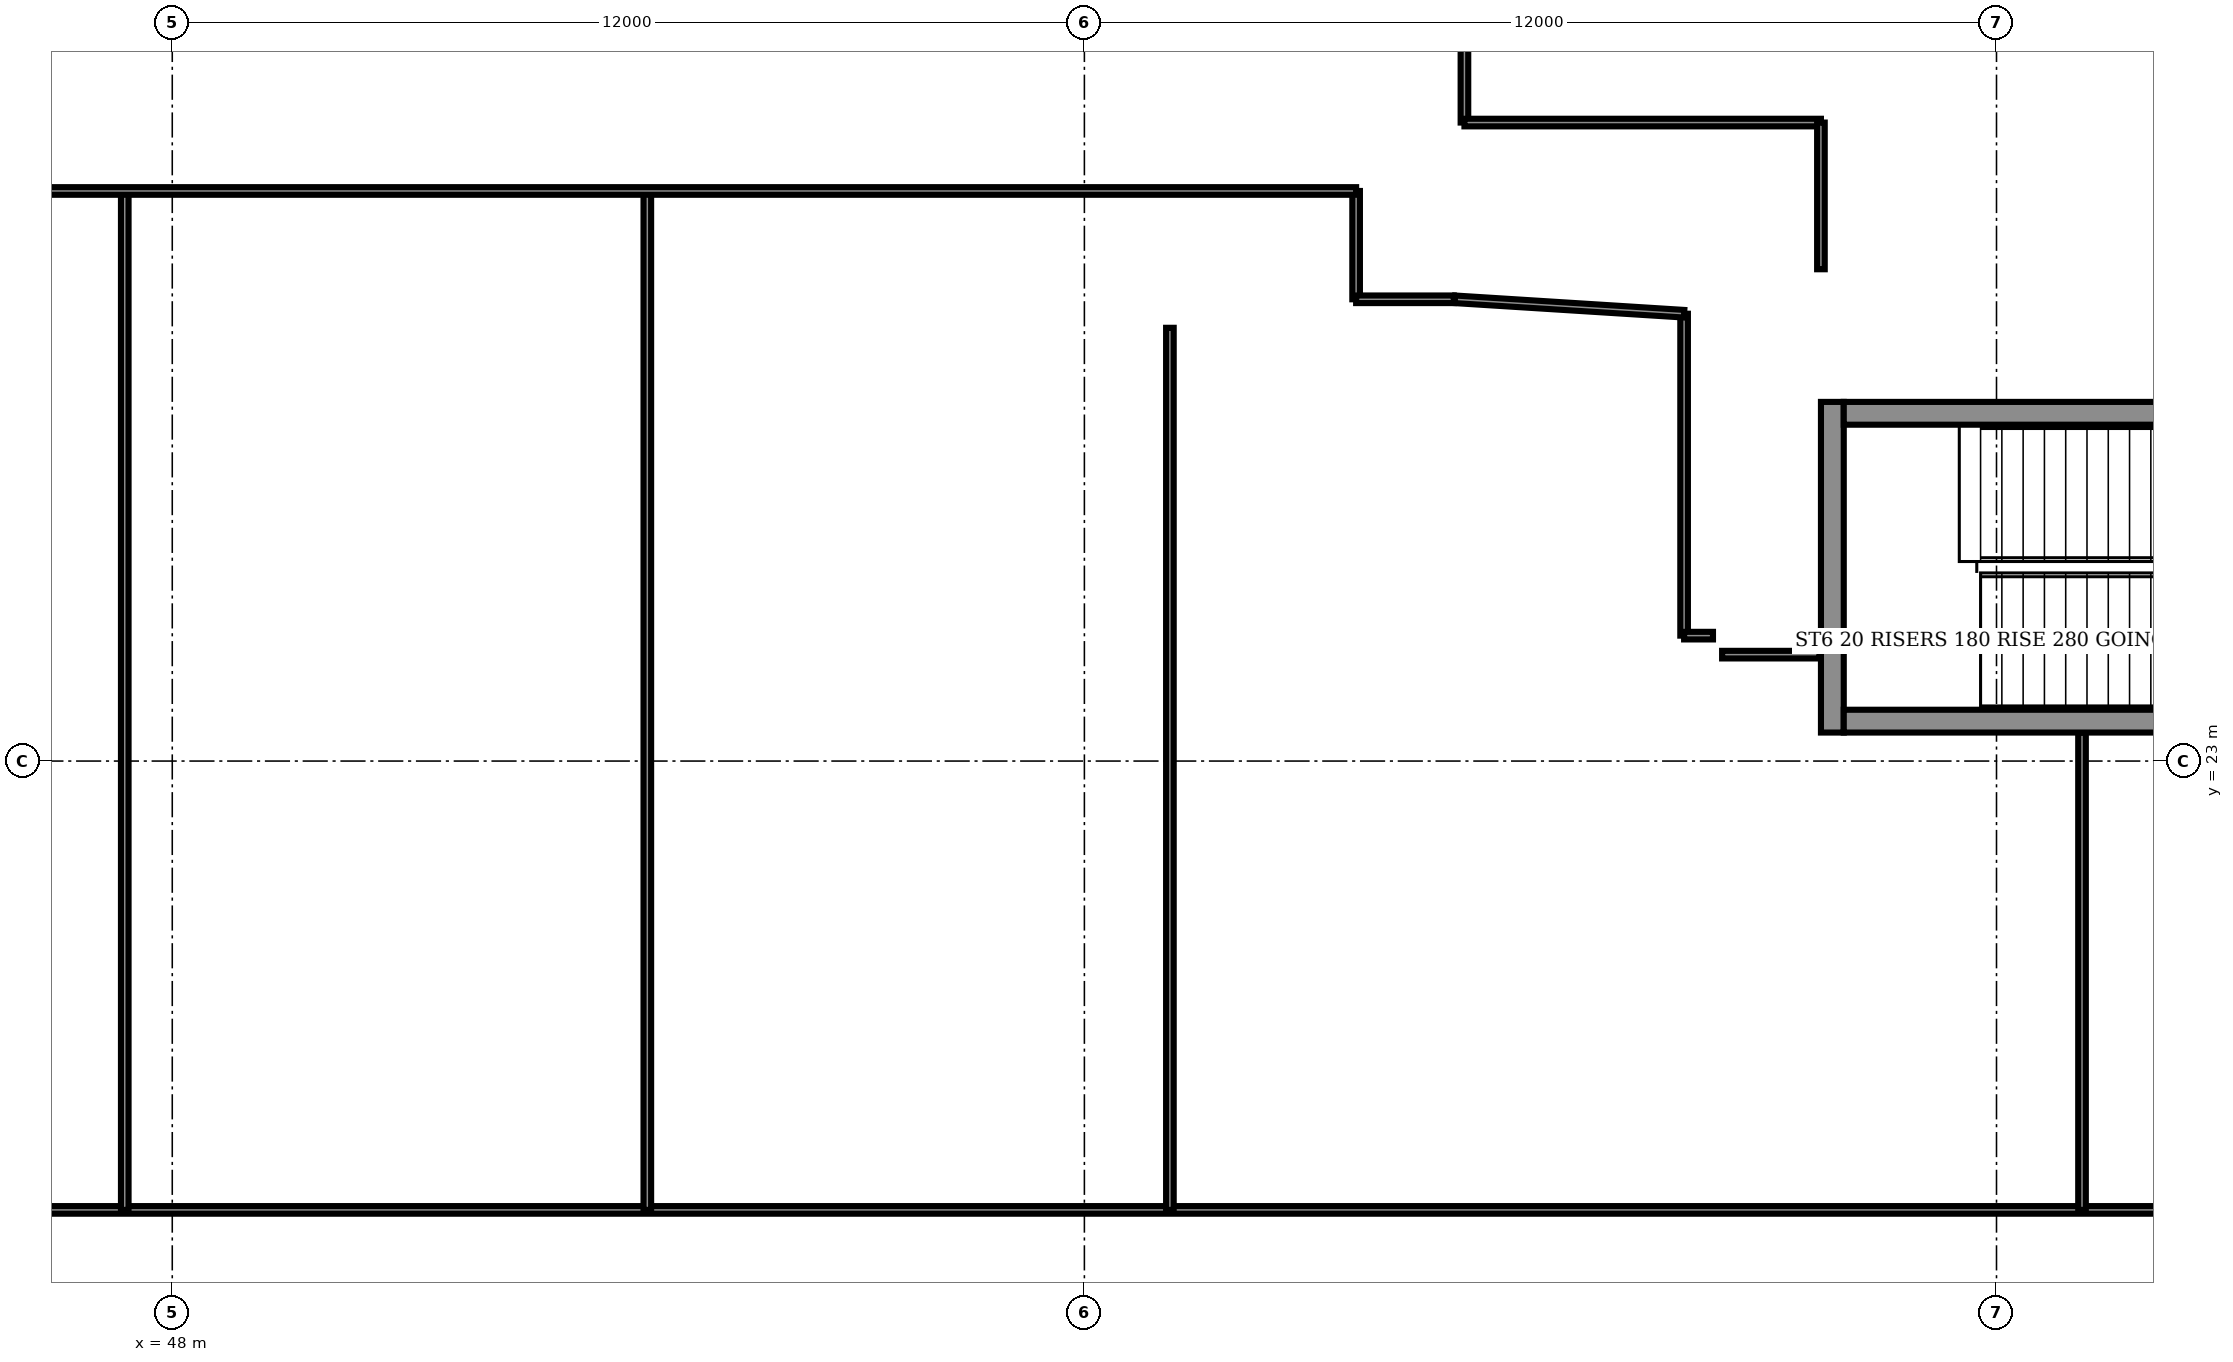
"""IFC4 building model, lengths in metres.
Left out: names, types, materials, properties, quantities, classifications, styles, units other than length and angle.
Written with IfcOpenShell. Run it as: python <this file> out.ifc"""

import sys

from ifc_helpers import new_model, si_unit, direction, frame, frame_2d, origin, origin_2d, place, context, subcontext, project, spatial, rectangle, i_section, extrude, element, fill, save


model = new_model("IFC4")
c1 = context("Model", 3, precision=1e-05, world=origin(), true_north=direction((0.0, 1.0)))
c2 = subcontext(c1, "Body", "Model", "MODEL_VIEW")
j1 = project(units=[si_unit("LENGTHUNIT", "METRE"), si_unit("PLANEANGLEUNIT", "RADIAN")], contexts=[c1])
p1 = place(None, origin())
s1 = spatial("IfcSite", under=j1, at=p1, CompositionType="ELEMENT")
p2 = place(p1, origin())
s2 = spatial("IfcBuilding", under=s1, at=p2, CompositionType="ELEMENT")
p3 = place(p2, frame((0.0, 0.0, 96.7)))
s3 = spatial("IfcBuildingStorey", under=s2, at=p3, CompositionType="ELEMENT", Elevation=96.7)
for number, where, z_axis, x_axis in (
    (1, (48.0, 23.0, 0.0), (0.0, 0.0, 1.0), (1.0, 0.0, 0.0)),
    (2, (60.0, 23.0, 0.0), (0.0, 0.0, 1.0), (1.0, 0.0, 0.0)),
):
    element("IfcColumn", number, at=place(p3, frame(where, z_axis=z_axis, x_axis=x_axis)), inside=s3, PredefinedType="COLUMN", context=c2, shape_type="SweptSolid", body=[
        extrude(i_section(OverallWidth=0.306, OverallDepth=0.524, WebThickness=0.021, FlangeThickness=0.04, FilletRadius=0.027, at=origin_2d()), origin(), (0.0, 0.0, 1.0), 3.6),
    ])
p4 = place(p3, frame((69.84, 23.375, 0.0), z_axis=(0.0, 0.0, 1.0), x_axis=(0.0, 1.0, 0.0)))
e3 = element("IfcWall", 3, at=p4, inside=s3, PredefinedType="SHEAR", context=c2, shape_type="SweptSolid", body=[
    extrude(rectangle(XDim=4.35, YDim=0.3, at=frame_2d((2.175, 0.0))), origin(), (0.0, 0.0, 1.0), 3.2),
])
p5 = place(p4, frame((1.575, 0.0, 0.0)))
e4 = element("IfcOpeningElement", 4, at=p5, cuts=e3, PredefinedType="OPENING", context=c2, shape_type="SweptSolid", body=[
    extrude(rectangle(XDim=1.2, YDim=2.1, at=frame_2d((0.6, 1.05))), frame((0.0, 0.16, 0.0), z_axis=(0.0, -1.0, 0.0), x_axis=(1.0, 0.0, 0.0)), (0.0, 0.0, 1.0), 0.32),
])
p6 = place(p3, frame((17.8, 17.095, 0.0), z_axis=(0.0, 0.0, 1.0), x_axis=(1.0, 0.0, 0.0)))
e5 = element("IfcWall", 5, at=p6, inside=s3, PredefinedType="PARTITIONING", context=c2, shape_type="SweptSolid", body=[
    extrude(rectangle(XDim=67.8, YDim=0.1, at=frame_2d((33.9, 0.0))), origin(), (0.0, 0.0, 1.0), 3.2),
])
p7 = place(p6, frame((12.0, 0.0, 0.0)))
e6 = element("IfcOpeningElement", 6, at=p7, cuts=e5, PredefinedType="OPENING", context=c2, shape_type="SweptSolid", body=[
    extrude(rectangle(XDim=1.0, YDim=2.1, at=frame_2d((0.5, 1.05))), frame((0.0, 0.06, 0.0), z_axis=(0.0, -1.0, 0.0), x_axis=(1.0, 0.0, 0.0)), (0.0, 0.0, 1.0), 0.12),
])
p8 = place(p6, frame((48.5, 0.0, 0.0)))
e7 = element("IfcOpeningElement", 7, at=p8, cuts=e5, PredefinedType="OPENING", context=c2, shape_type="SweptSolid", body=[
    extrude(rectangle(XDim=1.8, YDim=2.1, at=frame_2d((0.9, 1.05))), frame((0.0, 0.06, 0.0), z_axis=(0.0, -1.0, 0.0), x_axis=(1.0, 0.0, 0.0)), (0.0, 0.0, 1.0), 0.12),
])
p9 = place(p6, frame((56.825, 0.0, 0.0)))
e8 = element("IfcOpeningElement", 8, at=p9, cuts=e5, PredefinedType="OPENING", context=c2, shape_type="SweptSolid", body=[
    extrude(rectangle(XDim=1.0, YDim=2.1, at=frame_2d((0.5, 1.05))), frame((0.0, 0.06, 0.0), z_axis=(0.0, -1.0, 0.0), x_axis=(1.0, 0.0, 0.0)), (0.0, 0.0, 1.0), 0.12),
])
p10 = place(p6, frame((60.825, 0.0, 0.0)))
e9 = element("IfcOpeningElement", 9, at=p10, cuts=e5, PredefinedType="OPENING", context=c2, shape_type="SweptSolid", body=[
    extrude(rectangle(XDim=1.0, YDim=2.1, at=frame_2d((0.5, 1.05))), frame((0.0, 0.06, 0.0), z_axis=(0.0, -1.0, 0.0), x_axis=(1.0, 0.0, 0.0)), (0.0, 0.0, 1.0), 0.12),
])
p11 = place(p6, frame((64.981, 0.0, 0.0)))
e10 = element("IfcOpeningElement", 10, at=p11, cuts=e5, PredefinedType="OPENING", context=c2, shape_type="SweptSolid", body=[
    extrude(rectangle(XDim=1.0, YDim=2.1, at=frame_2d((0.5, 1.05))), frame((0.0, 0.06, 0.0), z_axis=(0.0, -1.0, 0.0), x_axis=(1.0, 0.0, 0.0)), (0.0, 0.0, 1.0), 0.12),
])
p12 = place(p3, frame((47.375, 17.095, 0.0), z_axis=(0.0, 0.0, 1.0), x_axis=(0.0, 1.0, 0.0)))
e11 = element("IfcWall", 11, at=p12, inside=s3, PredefinedType="PARTITIONING", context=c2, shape_type="SweptSolid", body=[
    extrude(rectangle(XDim=13.405, YDim=0.1, at=frame_2d((6.703, 0.0))), origin(), (0.0, 0.0, 1.0), 3.2),
])
p13 = place(p3, frame((54.25, 17.095, 0.0), z_axis=(0.0, 0.0, 1.0), x_axis=(0.0, 1.0, 0.0)))
e12 = element("IfcWall", 12, at=p13, inside=s3, PredefinedType="PARTITIONING", context=c2, shape_type="SweptSolid", body=[
    extrude(rectangle(XDim=13.395, YDim=0.1, at=frame_2d((6.698, 0.0))), origin(), (0.0, 0.0, 1.0), 3.2),
])
p14 = place(p3, frame((54.25, 28.7, 0.0), z_axis=(0.0, 0.0, 1.0), x_axis=(1.0, 0.0, 0.0)))
e13 = element("IfcWall", 13, at=p14, inside=s3, PredefinedType="PARTITIONING", context=c2, shape_type="SweptSolid", body=[
    extrude(rectangle(XDim=6.875, YDim=0.1, at=frame_2d((3.438, 0.0))), origin(), (0.0, 0.0, 1.0), 3.2),
])
p15 = place(p14, frame((0.87, 0.0, 0.0)))
e14 = element("IfcOpeningElement", 14, at=p15, cuts=e13, PredefinedType="OPENING", context=c2, shape_type="SweptSolid", body=[
    extrude(rectangle(XDim=0.9, YDim=2.1, at=frame_2d((0.45, 1.05))), frame((0.0, 0.06, 0.0), z_axis=(0.0, -1.0, 0.0), x_axis=(1.0, 0.0, 0.0)), (0.0, 0.0, 1.0), 0.12),
])
p16 = place(p14, frame((3.26, 0.0, 0.0)))
e15 = element("IfcOpeningElement", 15, at=p16, cuts=e13, PredefinedType="OPENING", context=c2, shape_type="SweptSolid", body=[
    extrude(rectangle(XDim=0.9, YDim=2.1, at=frame_2d((0.45, 1.05))), frame((0.0, 0.06, 0.0), z_axis=(0.0, -1.0, 0.0), x_axis=(1.0, 0.0, 0.0)), (0.0, 0.0, 1.0), 0.12),
])
p17 = place(p14, frame((5.395, 0.0, 0.0)))
e16 = element("IfcOpeningElement", 16, at=p17, cuts=e13, PredefinedType="OPENING", context=c2, shape_type="SweptSolid", body=[
    extrude(rectangle(XDim=1.0, YDim=2.1, at=frame_2d((0.5, 1.05))), frame((0.0, 0.06, 0.0), z_axis=(0.0, -1.0, 0.0), x_axis=(1.0, 0.0, 0.0)), (0.0, 0.0, 1.0), 0.12),
])
for number, where, z_axis, x_axis in (
    (17, (56.84, 17.095, 0.0), (0.0, 0.0, 1.0), (0.0, 1.0, 0.0)),
    (18, (59.225, 17.095, 0.0), (0.0, 0.0, 1.0), (0.0, 1.0, 0.0)),
    (19, (61.125, 17.095, 0.0), (0.0, 0.0, 1.0), (0.0, 1.0, 0.0)),
):
    element("IfcWall", number, at=place(p3, frame(where, z_axis=z_axis, x_axis=x_axis)), inside=s3, PredefinedType="PARTITIONING", context=c2, shape_type="SweptSolid", body=[
        extrude(rectangle(XDim=11.605, YDim=0.1, at=frame_2d((5.802, 0.0))), origin(), (0.0, 0.0, 1.0), 3.2),
    ])
p18 = place(p3, frame((63.575, 29.075, 0.0), z_axis=(0.0, 0.0, 1.0), x_axis=(0.0, 1.0, 0.0)))
e20 = element("IfcWall", 20, at=p18, inside=s3, PredefinedType="PARTITIONING", context=c2, shape_type="SweptSolid", body=[
    extrude(rectangle(XDim=1.425, YDim=0.1, at=frame_2d((0.712, 0.0))), origin(), (0.0, 0.0, 1.0), 3.2),
])
p19 = place(p3, frame((63.575, 29.075, 0.0), z_axis=(0.0, 0.0, 1.0), x_axis=(1.0, 0.0, 0.0)))
e21 = element("IfcWall", 21, at=p19, inside=s3, PredefinedType="PARTITIONING", context=c2, shape_type="SweptSolid", body=[
    extrude(rectangle(XDim=1.285, YDim=0.1, at=frame_2d((0.643, 0.0))), origin(), (0.0, 0.0, 1.0), 3.2),
])
p20 = place(p3, frame((65.0, 31.4, 0.0), z_axis=(0.0, 0.0, 1.0), x_axis=(0.0, 1.0, 0.0)))
e22 = element("IfcWall", 22, at=p20, inside=s3, PredefinedType="PARTITIONING", context=c2, shape_type="SweptSolid", body=[
    extrude(rectangle(XDim=2.58, YDim=0.1, at=frame_2d((1.29, 0.0))), origin(), (0.0, 0.0, 1.0), 3.2),
])
p21 = place(p3, frame((65.0, 31.4, 0.0), z_axis=(0.0, 0.0, 1.0), x_axis=(1.0, 0.0, 0.0)))
e23 = element("IfcWall", 23, at=p21, inside=s3, PredefinedType="PARTITIONING", context=c2, shape_type="SweptSolid", body=[
    extrude(rectangle(XDim=4.69, YDim=0.1, at=frame_2d((2.345, 0.0))), origin(), (0.0, 0.0, 1.0), 3.2),
])
p22 = place(p21, frame((0.19, 0.0, 0.0)))
e24 = element("IfcOpeningElement", 24, at=p22, cuts=e23, PredefinedType="OPENING", context=c2, shape_type="SweptSolid", body=[
    extrude(rectangle(XDim=1.8, YDim=2.1, at=frame_2d((0.9, 1.05))), frame((0.0, 0.06, 0.0), z_axis=(0.0, -1.0, 0.0), x_axis=(1.0, 0.0, 0.0)), (0.0, 0.0, 1.0), 0.12),
])
p23 = place(p3, frame((67.89, 24.65, 0.0), z_axis=(0.0, 0.0, 1.0), x_axis=(0.0, 1.0, 0.0)))
e25 = element("IfcWall", 25, at=p23, inside=s3, PredefinedType="PARTITIONING", context=c2, shape_type="SweptSolid", body=[
    extrude(rectangle(XDim=4.235, YDim=0.1, at=frame_2d((2.118, 0.0))), origin(), (0.0, 0.0, 1.0), 3.2),
])
p24 = place(p3, frame((67.89, 24.65, 0.0), z_axis=(0.0, 0.0, 1.0), x_axis=(1.0, 0.0, 0.0)))
e26 = element("IfcWall", 26, at=p24, inside=s3, PredefinedType="PARTITIONING", context=c2, shape_type="SweptSolid", body=[
    extrude(rectangle(XDim=0.38, YDim=0.1, at=frame_2d((0.19, 0.0))), origin(), (0.0, 0.0, 1.0), 3.2),
])
p25 = place(p3, frame((67.89, 28.885, 0.0), z_axis=(0.0, 0.0, 1.0), x_axis=(-0.998031, 0.062786, 0.0)))
e27 = element("IfcWall", 27, at=p25, inside=s3, PredefinedType="PARTITIONING", context=c2, shape_type="SweptSolid", body=[
    extrude(rectangle(XDim=3.021, YDim=0.1, at=frame_2d((1.511, 0.0))), origin(), (0.0, 0.0, 1.0), 3.2),
])
p26 = place(p3, frame((68.39, 24.4, 0.0), z_axis=(0.0, 0.0, 1.0), x_axis=(1.0, 0.0, 0.0)))
e28 = element("IfcWall", 28, at=p26, inside=s3, PredefinedType="PARTITIONING", context=c2, shape_type="SweptSolid", body=[
    extrude(rectangle(XDim=1.281, YDim=0.1, at=frame_2d((0.64, 0.0))), origin(), (0.0, 0.0, 1.0), 3.2),
])
p27 = place(p3, frame((69.69, 29.47, 0.0), z_axis=(0.0, 0.0, 1.0), x_axis=(0.0, 1.0, 0.0)))
e29 = element("IfcWall", 29, at=p27, inside=s3, PredefinedType="PARTITIONING", context=c2, shape_type="SweptSolid", body=[
    extrude(rectangle(XDim=1.93, YDim=0.1, at=frame_2d((0.965, 0.0))), origin(), (0.0, 0.0, 1.0), 3.2),
])
p28 = place(p3, frame((73.125, 17.095, 0.0), z_axis=(0.0, 0.0, 1.0), x_axis=(0.0, 1.0, 0.0)))
e30 = element("IfcWall", 30, at=p28, inside=s3, PredefinedType="PARTITIONING", context=c2, shape_type="SweptSolid", body=[
    extrude(rectangle(XDim=6.28, YDim=0.1, at=frame_2d((3.14, 0.0))), origin(), (0.0, 0.0, 1.0), 3.2),
])
p29 = place(p3, frame((44.15, 30.5, 0.0), z_axis=(0.0, 0.0, 1.0), x_axis=(1.0, 0.0, 0.0)))
e31 = element("IfcWall", 31, at=p29, inside=s3, PredefinedType="PARTITIONING", context=c2, shape_type="SweptSolid", body=[
    extrude(rectangle(XDim=19.425, YDim=0.1, at=frame_2d((9.712, 0.0))), origin(), (0.0, 0.0, 1.0), 3.2),
])
p30 = place(p29, frame((6.245, 0.0, 0.0)))
e32 = element("IfcOpeningElement", 32, at=p30, cuts=e31, PredefinedType="OPENING", context=c2, shape_type="SweptSolid", body=[
    extrude(rectangle(XDim=1.0, YDim=2.1, at=frame_2d((0.5, 1.05))), frame((0.0, 0.06, 0.0), z_axis=(0.0, -1.0, 0.0), x_axis=(1.0, 0.0, 0.0)), (0.0, 0.0, 1.0), 0.12),
])
for number, where, z_axis, x_axis in (
    (33, (69.99, 23.525, 0.0), (0.0, 0.0, 1.0), (1.0, 0.0, 0.0)),
    (34, (69.99, 27.575, 0.0), (0.0, 0.0, 1.0), (1.0, 0.0, 0.0)),
):
    element("IfcWall", number, at=place(p3, frame(where, z_axis=z_axis, x_axis=x_axis)), inside=s3, PredefinedType="SHEAR", context=c2, shape_type="SweptSolid", body=[
        extrude(rectangle(XDim=7.5, YDim=0.3, at=frame_2d((3.75, 0.0))), origin(), (0.0, 0.0, 1.0), 3.2),
    ])
p31 = place(p5, origin())
e35 = element("IfcDoor", 35, at=p31, inside=s3, OperationType="SINGLE_SWING_RIGHT", PredefinedType="DOOR", context=c2, shape_type="SweptSolid", body=[
    extrude(rectangle(XDim=1.2, YDim=2.1, at=frame_2d((0.6, 1.05))), frame((0.0, 0.025, 0.0), z_axis=(0.0, -1.0, 0.0), x_axis=(1.0, 0.0, 0.0)), (0.0, 0.0, 1.0), 0.05),
])
fill(e4, e35)
p32 = place(p8, origin())
e36 = element("IfcDoor", 36, at=p32, inside=s3, OperationType="DOUBLE_DOOR_SINGLE_SWING", PredefinedType="DOOR", context=c2, shape_type="SweptSolid", body=[
    extrude(rectangle(XDim=1.8, YDim=2.1, at=frame_2d((0.9, 1.05))), frame((0.0, 0.025, 0.0), z_axis=(0.0, -1.0, 0.0), x_axis=(1.0, 0.0, 0.0)), (0.0, 0.0, 1.0), 0.05),
])
fill(e7, e36)
p33 = place(p15, origin())
e37 = element("IfcDoor", 37, at=p33, inside=s3, OperationType="SINGLE_SWING_LEFT", PredefinedType="DOOR", context=c2, shape_type="SweptSolid", body=[
    extrude(rectangle(XDim=0.9, YDim=2.1, at=frame_2d((0.45, 1.05))), frame((0.0, 0.025, 0.0), z_axis=(0.0, -1.0, 0.0), x_axis=(1.0, 0.0, 0.0)), (0.0, 0.0, 1.0), 0.05),
])
fill(e14, e37)
p34 = place(p16, origin())
e38 = element("IfcDoor", 38, at=p34, inside=s3, OperationType="SINGLE_SWING_RIGHT", PredefinedType="DOOR", context=c2, shape_type="SweptSolid", body=[
    extrude(rectangle(XDim=0.9, YDim=2.1, at=frame_2d((0.45, 1.05))), frame((0.0, 0.025, 0.0), z_axis=(0.0, -1.0, 0.0), x_axis=(1.0, 0.0, 0.0)), (0.0, 0.0, 1.0), 0.05),
])
fill(e15, e38)
p35 = place(p17, origin())
e39 = element("IfcDoor", 39, at=p35, inside=s3, OperationType="SINGLE_SWING_RIGHT", PredefinedType="DOOR", context=c2, shape_type="SweptSolid", body=[
    extrude(rectangle(XDim=1.0, YDim=2.1, at=frame_2d((0.5, 1.05))), frame((0.0, 0.025, 0.0), z_axis=(0.0, -1.0, 0.0), x_axis=(1.0, 0.0, 0.0)), (0.0, 0.0, 1.0), 0.05),
])
fill(e16, e39)
p36 = place(p30, origin())
e40 = element("IfcDoor", 40, at=p36, inside=s3, OperationType="SINGLE_SWING_RIGHT", PredefinedType="DOOR", context=c2, shape_type="SweptSolid", body=[
    extrude(rectangle(XDim=1.0, YDim=2.1, at=frame_2d((0.5, 1.05))), frame((0.0, 0.025, 0.0), z_axis=(0.0, -1.0, 0.0), x_axis=(1.0, 0.0, 0.0)), (0.0, 0.0, 1.0), 0.05),
])
fill(e32, e40)
p37 = place(p22, origin())
e41 = element("IfcDoor", 41, at=p37, inside=s3, OperationType="DOUBLE_DOOR_SINGLE_SWING", PredefinedType="DOOR", context=c2, shape_type="SweptSolid", body=[
    extrude(rectangle(XDim=1.8, YDim=2.1, at=frame_2d((0.9, 1.05))), frame((0.0, 0.025, 0.0), z_axis=(0.0, -1.0, 0.0), x_axis=(1.0, 0.0, 0.0)), (0.0, 0.0, 1.0), 0.05),
])
fill(e24, e41)
save(model, sys.argv[1])
